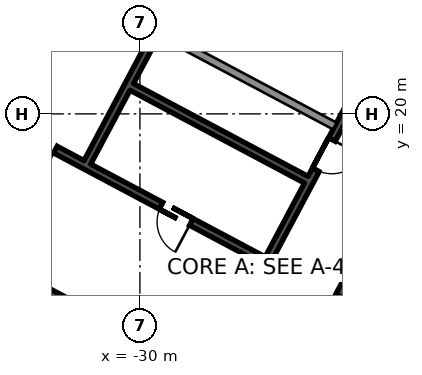
"""IFC4 building model, lengths in metres.
Left out: names, types, materials, properties, quantities, classifications, styles, units other than length and angle.
Written with IfcOpenShell. Run it as: python <this file> out.ifc"""

import sys

from ifc_helpers import new_model, si_unit, direction, frame, frame_2d, origin, place, context, subcontext, project, spatial, rectangle, extrude, element, fill, save


model = new_model("IFC4")
c1 = context("Model", 3, precision=1e-05, world=origin(), true_north=direction((0.0, 1.0)))
c2 = subcontext(c1, "Body", "Model", "MODEL_VIEW")
j1 = project(units=[si_unit("LENGTHUNIT", "METRE"), si_unit("PLANEANGLEUNIT", "RADIAN")], contexts=[c1])
p1 = place(None, origin())
s1 = spatial("IfcSite", under=j1, at=p1, CompositionType="ELEMENT")
p2 = place(p1, origin())
s2 = spatial("IfcBuilding", under=s1, at=p2, CompositionType="ELEMENT")
p3 = place(p2, frame((0.0, 0.0, 248.1)))
s3 = spatial("IfcBuildingStorey", under=s2, at=p3, CompositionType="ELEMENT", Elevation=248.1)
p4 = place(p3, frame((-32.0, 28.001, 0.0), z_axis=(0.0, 0.0, 1.0), x_axis=(-0.469468958625, -0.882948977511, 0.0)))
e1 = element("IfcWall", 1, at=p4, inside=s3, PredefinedType="SHEAR", context=c2, shape_type="SweptSolid", body=[
    extrude(rectangle(XDim=19.4, YDim=0.6, at=frame_2d((9.7, 0.0))), origin(), (0.0, 0.0, 1.0), 3.9),
])
p5 = place(p4, frame((10.3, 0.0, 0.0)))
e2 = element("IfcOpeningElement", 2, at=p5, cuts=e1, PredefinedType="OPENING", context=c2, shape_type="SweptSolid", body=[
    extrude(rectangle(XDim=2.4, YDim=2.4, at=frame_2d((1.2, 1.2))), frame((0.0, 0.31, 0.0), z_axis=(0.0, -1.0, 0.0), x_axis=(1.0, 0.0, 0.0)), (0.0, 0.0, 1.0), 0.62),
])
p6 = place(p3, frame((-14.041, 18.112, 0.0), z_axis=(0.0, 0.0, 1.0), x_axis=(-0.882947755831, 0.46947125628, 0.0)))
e3 = element("IfcWall", 3, at=p6, inside=s3, PredefinedType="SHEAR", context=c2, shape_type="SweptSolid", body=[
    extrude(rectangle(XDim=20.2, YDim=0.6, at=frame_2d((10.1, 0.0))), origin(), (0.0, 0.0, 1.0), 3.9),
])
p7 = place(p3, frame((-21.333, 21.649, 0.0), z_axis=(0.0, 0.0, 1.0), x_axis=(-0.469494272526, -0.882935517501, 0.0)))
e4 = element("IfcWall", 4, at=p7, inside=s3, PredefinedType="SHEAR", context=c2, shape_type="SweptSolid", body=[
    extrude(rectangle(XDim=7.3, YDim=0.2, at=frame_2d((3.65, 0.0))), origin(), (0.0, 0.0, 1.0), 3.9),
])
p8 = place(p7, frame((1.3, 0.0, 0.0)))
e5 = element("IfcOpeningElement", 5, at=p8, cuts=e4, PredefinedType="OPENING", context=c2, shape_type="SweptSolid", body=[
    extrude(rectangle(XDim=1.2, YDim=2.1, at=frame_2d((0.6, 1.05))), frame((0.0, 0.11, 0.0), z_axis=(0.0, -1.0, 0.0), x_axis=(1.0, 0.0, 0.0)), (0.0, 0.0, 1.0), 0.22),
])
p9 = place(p3, frame((-23.188, 22.635, 0.0), z_axis=(0.0, 0.0, 1.0), x_axis=(-0.469454336211, -0.882956752176, 0.0)))
e6 = element("IfcWall", 6, at=p9, inside=s3, PredefinedType="SHEAR", context=c2, shape_type="SweptSolid", body=[
    extrude(rectangle(XDim=7.3, YDim=0.2, at=frame_2d((3.65, 0.0))), origin(), (0.0, 0.0, 1.0), 3.9),
])
p10 = place(p9, frame((1.25, 0.0, 0.0)))
e7 = element("IfcOpeningElement", 7, at=p10, cuts=e6, PredefinedType="OPENING", context=c2, shape_type="SweptSolid", body=[
    extrude(rectangle(XDim=0.9, YDim=2.1, at=frame_2d((0.45, 1.05))), frame((0.0, 0.11, 0.0), z_axis=(0.0, -1.0, 0.0), x_axis=(1.0, 0.0, 0.0)), (0.0, 0.0, 1.0), 0.22),
])
p11 = place(p9, frame((3.75, 0.0, 0.0)))
e8 = element("IfcOpeningElement", 8, at=p11, cuts=e6, PredefinedType="OPENING", context=c2, shape_type="SweptSolid", body=[
    extrude(rectangle(XDim=0.9, YDim=2.1, at=frame_2d((0.45, 1.05))), frame((0.0, 0.11, 0.0), z_axis=(0.0, -1.0, 0.0), x_axis=(1.0, 0.0, 0.0)), (0.0, 0.0, 1.0), 0.22),
])
p12 = place(p3, frame((-27.955, 25.171, 0.0), z_axis=(0.0, 0.0, 1.0), x_axis=(-0.469480409012, -0.88294288918, 0.0)))
e9 = element("IfcWall", 9, at=p12, inside=s3, PredefinedType="SHEAR", context=c2, shape_type="SweptSolid", body=[
    extrude(rectangle(XDim=7.3, YDim=0.2, at=frame_2d((3.65, 0.0))), origin(), (0.0, 0.0, 1.0), 3.9),
])
p13 = place(p3, frame((-24.872, 19.68, 0.0), z_axis=(0.0, 0.0, 1.0), x_axis=(-0.882953967957, 0.469459572775, 0.0)))
e10 = element("IfcWall", 10, at=p13, inside=s3, PredefinedType="SOLIDWALL", context=c2, shape_type="SweptSolid", body=[
    extrude(rectangle(XDim=5.2, YDim=0.2, at=frame_2d((2.6, 0.0))), origin(), (0.0, 0.0, 1.0), 3.9),
])
p14 = place(p3, frame((-25.623, 18.268, 0.0), z_axis=(0.0, 0.0, 1.0), x_axis=(-0.882953967957, 0.469459572775, 0.0)))
e11 = element("IfcWall", 11, at=p14, inside=s3, PredefinedType="SHEAR", context=c2, shape_type="SweptSolid", body=[
    extrude(rectangle(XDim=5.2, YDim=0.2, at=frame_2d((2.6, 0.0))), origin(), (0.0, 0.0, 1.0), 3.9),
])
p15 = place(p3, frame((-26.662, 16.102, 0.0), z_axis=(0.0, 0.0, 1.0), x_axis=(-0.882940221191, 0.469485426614, 0.0)))
e12 = element("IfcWall", 12, at=p15, inside=s3, PredefinedType="SHEAR", context=c2, shape_type="SweptSolid", body=[
    extrude(rectangle(XDim=10.0, YDim=0.2, at=frame_2d((5.0, 0.0))), origin(), (0.0, 0.0, 1.0), 3.9),
])
p16 = place(p15, frame((6.3, 0.0, 0.0)))
e13 = element("IfcOpeningElement", 13, at=p16, cuts=e12, PredefinedType="OPENING", context=c2, shape_type="SweptSolid", body=[
    extrude(rectangle(XDim=1.2, YDim=2.1, at=frame_2d((0.6, 1.05))), frame((0.0, 0.11, 0.0), z_axis=(0.0, -1.0, 0.0), x_axis=(1.0, 0.0, 0.0)), (0.0, 0.0, 1.0), 0.22),
])
p17 = place(p15, frame((2.25, 0.0, 0.0)))
e14 = element("IfcOpeningElement", 14, at=p17, cuts=e12, PredefinedType="OPENING", context=c2, shape_type="SweptSolid", body=[
    extrude(rectangle(XDim=0.9, YDim=2.1, at=frame_2d((0.45, 1.05))), frame((0.0, 0.11, 0.0), z_axis=(0.0, -1.0, 0.0), x_axis=(1.0, 0.0, 0.0)), (0.0, 0.0, 1.0), 0.22),
])
p18 = place(p3, frame((-29.935, 13.991, 0.0), z_axis=(0.0, 0.0, 1.0), x_axis=(-0.882952937579, 0.469461510692, 0.0)))
e15 = element("IfcWall", 15, at=p18, inside=s3, PredefinedType="SHEAR", context=c2, shape_type="SweptSolid", body=[
    extrude(rectangle(XDim=5.4, YDim=0.2, at=frame_2d((2.7, 0.0))), origin(), (0.0, 0.0, 1.0), 3.9),
])
p19 = place(p18, frame((0.8, 0.0, 0.0)))
e16 = element("IfcOpeningElement", 16, at=p19, cuts=e15, PredefinedType="OPENING", context=c2, shape_type="SweptSolid", body=[
    extrude(rectangle(XDim=1.1, YDim=2.1, at=frame_2d((0.55, 1.05))), frame((0.0, 0.11, 0.0), z_axis=(0.0, -1.0, 0.0), x_axis=(1.0, 0.0, 0.0)), (0.0, 0.0, 1.0), 0.22),
])
p20 = place(p18, frame((3.5, 0.0, 0.0)))
e17 = element("IfcOpeningElement", 17, at=p20, cuts=e15, PredefinedType="OPENING", context=c2, shape_type="SweptSolid", body=[
    extrude(rectangle(XDim=1.1, YDim=2.1, at=frame_2d((0.55, 1.05))), frame((0.0, 0.11, 0.0), z_axis=(0.0, -1.0, 0.0), x_axis=(1.0, 0.0, 0.0)), (0.0, 0.0, 1.0), 0.22),
])
p21 = place(p3, frame((-31.15, 11.919, 0.0), z_axis=(0.0, 0.0, 1.0), x_axis=(-0.882940221191, 0.469485426614, 0.0)))
e18 = element("IfcWall", 18, at=p21, inside=s3, PredefinedType="SHEAR", context=c2, shape_type="SweptSolid", body=[
    extrude(rectangle(XDim=8.0, YDim=0.2, at=frame_2d((4.0, 0.0))), origin(), (0.0, 0.0, 1.0), 3.9),
])
p22 = place(p3, frame((-48.541, 39.854, 0.0), z_axis=(0.0, 0.0, 1.0), x_axis=(0.882945008423, -0.469476423372, 0.0)))
e19 = element("IfcWall", 19, at=p22, inside=s3, PredefinedType="PARTITIONING", context=c2, shape_type="SweptSolid", body=[
    extrude(rectangle(XDim=54.976, YDim=0.15, at=frame_2d((27.488, 0.0))), origin(), (0.0, 0.0, 1.0), 3.45),
])
p23 = place(p22, frame((33.65, 0.0, 0.0)))
e20 = element("IfcOpeningElement", 20, at=p23, cuts=e19, PredefinedType="OPENING", context=c2, shape_type="SweptSolid", body=[
    extrude(rectangle(XDim=1.8, YDim=2.1, at=frame_2d((0.9, 1.05))), frame((0.0, 0.085, 0.0), z_axis=(0.0, -1.0, 0.0), x_axis=(1.0, 0.0, 0.0)), (0.0, 0.0, 1.0), 0.17),
])
p24 = place(p22, frame((26.95, 0.0, 0.0)))
e21 = element("IfcOpeningElement", 21, at=p24, cuts=e19, PredefinedType="OPENING", context=c2, shape_type="SweptSolid", body=[
    extrude(rectangle(XDim=1.0, YDim=2.1, at=frame_2d((0.5, 1.05))), frame((0.0, 0.085, 0.0), z_axis=(0.0, -1.0, 0.0), x_axis=(1.0, 0.0, 0.0)), (0.0, 0.0, 1.0), 0.17),
])
p25 = place(p22, frame((21.05, 0.0, 0.0)))
e22 = element("IfcOpeningElement", 22, at=p25, cuts=e19, PredefinedType="OPENING", context=c2, shape_type="SweptSolid", body=[
    extrude(rectangle(XDim=1.0, YDim=2.1, at=frame_2d((0.5, 1.05))), frame((0.0, 0.085, 0.0), z_axis=(0.0, -1.0, 0.0), x_axis=(1.0, 0.0, 0.0)), (0.0, 0.0, 1.0), 0.17),
])
p26 = place(p22, frame((15.35, 0.0, 0.0)))
e23 = element("IfcOpeningElement", 23, at=p26, cuts=e19, PredefinedType="OPENING", context=c2, shape_type="SweptSolid", body=[
    extrude(rectangle(XDim=1.0, YDim=2.1, at=frame_2d((0.5, 1.05))), frame((0.0, 0.085, 0.0), z_axis=(0.0, -1.0, 0.0), x_axis=(1.0, 0.0, 0.0)), (0.0, 0.0, 1.0), 0.17),
])
p27 = place(p16, origin())
e24 = element("IfcDoor", 24, at=p27, inside=s3, OperationType="SINGLE_SWING_LEFT", PredefinedType="DOOR", context=c2, shape_type="SweptSolid", body=[
    extrude(rectangle(XDim=1.2, YDim=2.1, at=frame_2d((0.6, 1.05))), frame((0.0, 0.025, 0.0), z_axis=(0.0, -1.0, 0.0), x_axis=(1.0, 0.0, 0.0)), (0.0, 0.0, 1.0), 0.05),
])
fill(e13, e24)
p28 = place(p17, origin())
e25 = element("IfcDoor", 25, at=p28, inside=s3, OperationType="SINGLE_SWING_LEFT", PredefinedType="DOOR", context=c2, shape_type="SweptSolid", body=[
    extrude(rectangle(XDim=0.9, YDim=2.1, at=frame_2d((0.45, 1.05))), frame((0.0, 0.025, 0.0), z_axis=(0.0, -1.0, 0.0), x_axis=(1.0, 0.0, 0.0)), (0.0, 0.0, 1.0), 0.05),
])
fill(e14, e25)
p29 = place(p11, origin())
e26 = element("IfcDoor", 26, at=p29, inside=s3, OperationType="SINGLE_SWING_LEFT", PredefinedType="DOOR", context=c2, shape_type="SweptSolid", body=[
    extrude(rectangle(XDim=0.9, YDim=2.1, at=frame_2d((0.45, 1.05))), frame((0.0, 0.025, 0.0), z_axis=(0.0, -1.0, 0.0), x_axis=(1.0, 0.0, 0.0)), (0.0, 0.0, 1.0), 0.05),
])
fill(e8, e26)
save(model, sys.argv[1])
